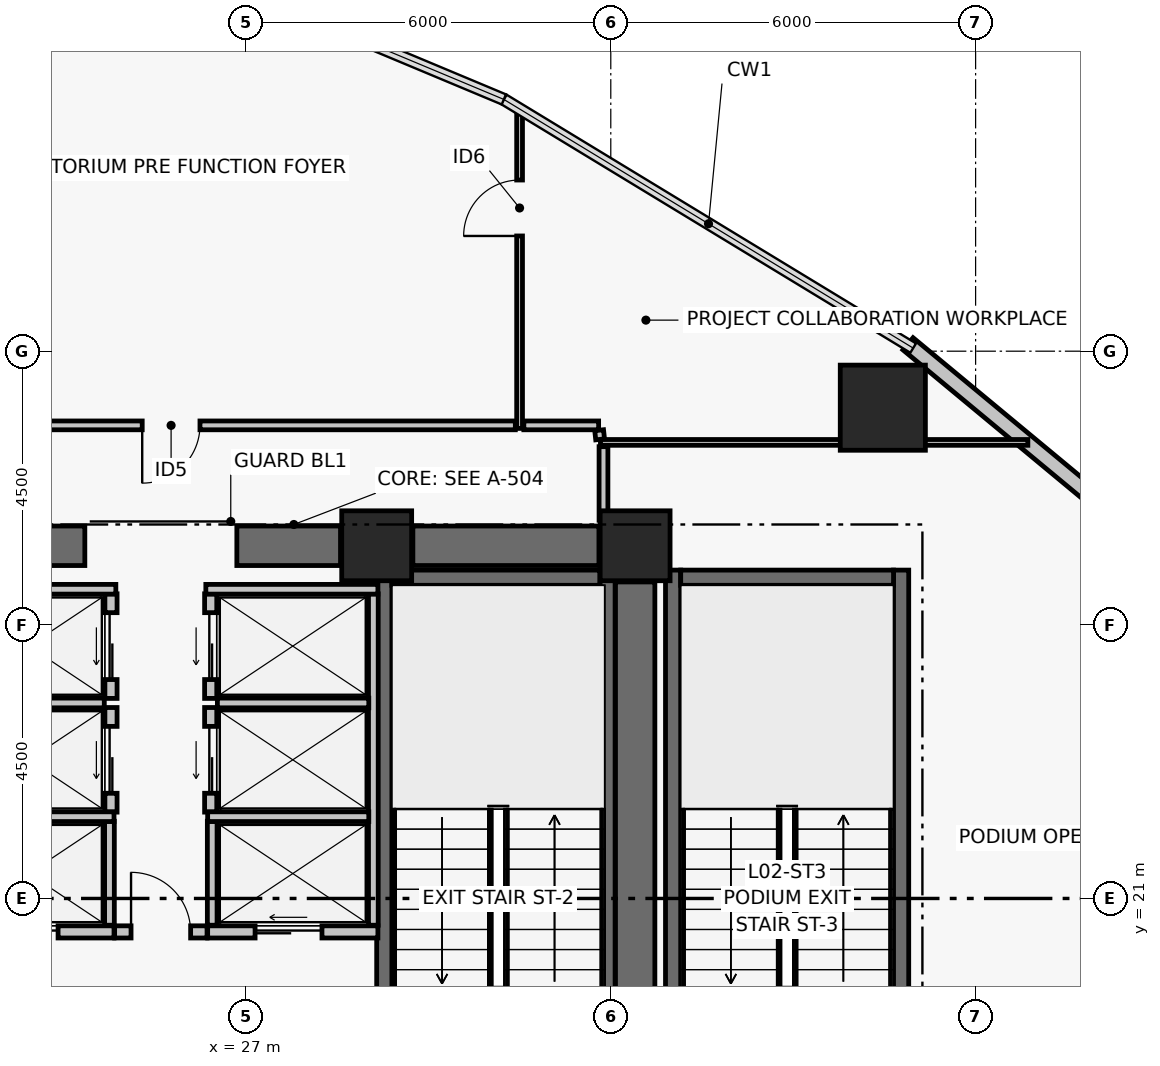
"""IFC4 building model, lengths in metres.
Left out: names, types, materials, properties, quantities, classifications, styles, units other than length and angle.
Written with IfcOpenShell. Run it as: python <this file> out.ifc"""

import sys

from ifc_helpers import new_model, si_unit, direction, frame, frame_2d, origin, origin_2d, place, context, subcontext, project, spatial, rectangle, hollow_rectangle, extrude, element, fill, save


model = new_model("IFC4")
c1 = context("Model", 3, precision=1e-05, world=origin(), true_north=direction((0.0, 1.0)))
c2 = subcontext(c1, "Body", "Model", "MODEL_VIEW")
j1 = project(units=[si_unit("LENGTHUNIT", "METRE"), si_unit("PLANEANGLEUNIT", "RADIAN")], contexts=[c1])
p1 = place(None, origin())
s1 = spatial("IfcSite", under=j1, at=p1, CompositionType="ELEMENT")
p2 = place(p1, origin())
s2 = spatial("IfcBuilding", under=s1, at=p2, CompositionType="ELEMENT")
p3 = place(p2, frame((0.0, 0.0, 12.0)))
s3 = spatial("IfcBuildingStorey", under=s2, at=p3, CompositionType="ELEMENT", Elevation=12.0)
for number, where, z_axis, x_axis in (
    (1, (29.15, 26.8, 0.0), (0.0, 0.0, 1.0), (1.0, 0.0, 0.0)),
    (2, (33.4, 26.8, 0.0), (0.0, 0.0, 1.0), (1.0, 0.0, 0.0)),
):
    element("IfcColumn", number, at=place(p3, frame(where, z_axis=z_axis, x_axis=x_axis)), inside=s3, PredefinedType="COLUMN", context=c2, shape_type="SweptSolid", body=[
        extrude(rectangle(XDim=1.15, YDim=1.15, at=origin_2d()), origin(), (0.0, 0.0, 1.0), 6.0),
    ])
p4 = place(p3, frame((22.645, 26.8, 0.0), z_axis=(0.0, 0.0, 1.0), x_axis=(1.0, 0.0, 0.0)))
e3 = element("IfcWall", 3, at=p4, inside=s3, PredefinedType="SHEAR", context=c2, shape_type="SweptSolid", body=[
    extrude(rectangle(XDim=1.705, YDim=0.65, at=frame_2d((0.853, 0.0))), origin(), (0.0, 0.0, 1.0), 5.68),
])
p5 = place(p3, frame((26.85, 26.8, 0.0), z_axis=(0.0, 0.0, 1.0), x_axis=(1.0, 0.0, 0.0)))
e4 = element("IfcWall", 4, at=p5, inside=s3, PredefinedType="SHEAR", context=c2, shape_type="SweptSolid", body=[
    extrude(rectangle(XDim=1.705, YDim=0.65, at=frame_2d((0.853, 0.0))), origin(), (0.0, 0.0, 1.0), 5.68),
])
p6 = place(p3, frame((29.745, 26.8, 0.0), z_axis=(0.0, 0.0, 1.0), x_axis=(1.0, 0.0, 0.0)))
e5 = element("IfcWall", 5, at=p6, inside=s3, PredefinedType="SHEAR", context=c2, shape_type="SweptSolid", body=[
    extrude(rectangle(XDim=3.06, YDim=0.65, at=frame_2d((1.53, 0.0))), origin(), (0.0, 0.0, 1.0), 5.68),
])
p7 = place(p3, frame((33.4, 17.795, 0.0), z_axis=(0.0, 0.0, 1.0), x_axis=(0.0, 1.0, 0.0)))
e6 = element("IfcWall", 6, at=p7, inside=s3, PredefinedType="SHEAR", context=c2, shape_type="SweptSolid", body=[
    extrude(rectangle(XDim=8.41, YDim=0.65, at=frame_2d((4.205, 0.0))), origin(), (0.0, 0.0, 1.0), 5.68),
])
p8 = place(p3, frame((29.275, 17.6, 0.0), z_axis=(0.0, 0.0, 1.0), x_axis=(0.0, 1.0, 0.0)))
e7 = element("IfcWall", 7, at=p8, inside=s3, PredefinedType="SHEAR", context=c2, shape_type="SweptSolid", body=[
    extrude(rectangle(XDim=8.8, YDim=0.25, at=frame_2d((4.4, 0.0))), origin(), (0.0, 0.0, 1.0), 5.68),
])
p9 = place(p8, frame((0.35, 0.0, 0.0)))
e8 = element("IfcOpeningElement", 8, at=p9, cuts=e7, PredefinedType="OPENING", context=c2, shape_type="SweptSolid", body=[
    extrude(rectangle(XDim=1.05, YDim=2.08, at=frame_2d((0.525, 1.04))), frame((0.0, 0.135, 0.0), z_axis=(0.0, -1.0, 0.0), x_axis=(1.0, 0.0, 0.0)), (0.0, 0.0, 1.0), 0.27),
])
p10 = place(p3, frame((32.946, 17.6, 0.0), z_axis=(0.0, 0.0, 1.0), x_axis=(0.0, 1.0, 0.0)))
e9 = element("IfcWall", 9, at=p10, inside=s3, PredefinedType="SHEAR", context=c2, shape_type="SweptSolid", body=[
    extrude(rectangle(XDim=8.8, YDim=0.25, at=frame_2d((4.4, 0.0))), origin(), (0.0, 0.0, 1.0), 5.68),
])
p11 = place(p3, frame((29.4, 26.275, 0.0), z_axis=(0.0, 0.0, 1.0), x_axis=(1.0, 0.0, 0.0)))
e10 = element("IfcWall", 10, at=p11, inside=s3, PredefinedType="SHEAR", context=c2, shape_type="SweptSolid", body=[
    extrude(rectangle(XDim=3.421, YDim=0.25, at=frame_2d((1.71, 0.0))), origin(), (0.0, 0.0, 1.0), 5.68),
])
for number, where, z_axis, x_axis in (
    (11, (34.025, 17.6, 0.0), (0.0, 0.0, 1.0), (0.0, 1.0, 0.0)),
    (12, (37.775, 17.6, 0.0), (0.0, 0.0, 1.0), (0.0, 1.0, 0.0)),
):
    element("IfcWall", number, at=place(p3, frame(where, z_axis=z_axis, x_axis=x_axis)), inside=s3, PredefinedType="SHEAR", context=c2, shape_type="SweptSolid", body=[
        extrude(rectangle(XDim=8.8, YDim=0.25, at=frame_2d((4.4, 0.0))), origin(), (0.0, 0.0, 1.0), 5.68),
    ])
p12 = place(p3, frame((34.15, 26.275, 0.0), z_axis=(0.0, 0.0, 1.0), x_axis=(1.0, 0.0, 0.0)))
e13 = element("IfcWall", 13, at=p12, inside=s3, PredefinedType="SHEAR", context=c2, shape_type="SweptSolid", body=[
    extrude(rectangle(XDim=3.5, YDim=0.25, at=frame_2d((1.75, 0.0))), origin(), (0.0, 0.0, 1.0), 5.68),
])
p13 = place(p3, frame((37.474, 29.071, 0.0), z_axis=(0.0, 0.0, 1.0), x_axis=(1.0, 0.0, 0.0)))
e14 = element("IfcColumn", 14, at=p13, inside=s3, PredefinedType="COLUMN", context=c2, shape_type="SweptSolid", body=[
    extrude(hollow_rectangle(XDim=1.4, YDim=1.4, WallThickness=0.055, at=origin_2d()), origin(), (0.0, 0.0, 1.0), 6.0),
])
p14 = place(p3, frame((37.888, 30.121, 0.0), z_axis=(0.0, 0.0, 1.0), x_axis=(0.769752944783, -0.638341917782, 0.0)))
e15 = element("IfcWall", 15, at=p14, inside=s3, PredefinedType="PARTITIONING", context=c2, shape_type="SweptSolid", body=[
    extrude(rectangle(XDim=8.167, YDim=0.26, at=frame_2d((4.083, 0.0))), origin(), (0.0, 0.0, 1.0), 5.68),
])
p15 = place(p3, frame((24.84, 20.45, 0.0), z_axis=(0.0, 0.0, 1.0), x_axis=(1.0, 0.0, 0.0)))
e16 = element("IfcWall", 16, at=p15, inside=s3, PredefinedType="PARTITIONING", context=c2, shape_type="SweptSolid", body=[
    extrude(rectangle(XDim=1.52, YDim=0.2, at=frame_2d((0.76, 0.0))), origin(), (0.0, 0.0, 1.0), 5.68),
])
p16 = place(p15, frame((0.27, 0.0, 0.0)))
e17 = element("IfcOpeningElement", 17, at=p16, cuts=e16, PredefinedType="OPENING", context=c2, shape_type="SweptSolid", body=[
    extrude(rectangle(XDim=0.98, YDim=2.06, at=frame_2d((0.49, 1.03))), frame((0.0, 0.11, 0.0), z_axis=(0.0, -1.0, 0.0), x_axis=(1.0, 0.0, 0.0)), (0.0, 0.0, 1.0), 0.22),
])
p17 = place(p3, frame((22.03, 20.45, 0.0), z_axis=(0.0, 0.0, 1.0), x_axis=(1.0, 0.0, 0.0)))
e18 = element("IfcWall", 18, at=p17, inside=s3, PredefinedType="PARTITIONING", context=c2, shape_type="SweptSolid", body=[
    extrude(rectangle(XDim=2.8, YDim=0.2, at=frame_2d((1.4, 0.0))), origin(), (0.0, 0.0, 1.0), 5.68),
])
p18 = place(p17, frame((0.78, 0.0, 0.0)))
e19 = element("IfcOpeningElement", 19, at=p18, cuts=e18, PredefinedType="OPENING", context=c2, shape_type="SweptSolid", body=[
    extrude(rectangle(XDim=1.1, YDim=2.08, at=frame_2d((0.55, 1.04))), frame((0.0, 0.11, 0.0), z_axis=(0.0, -1.0, 0.0), x_axis=(1.0, 0.0, 0.0)), (0.0, 0.0, 1.0), 0.22),
])
p19 = place(p3, frame((26.37, 20.45, 0.0), z_axis=(0.0, 0.0, 1.0), x_axis=(1.0, 0.0, 0.0)))
e20 = element("IfcWall", 20, at=p19, inside=s3, PredefinedType="PARTITIONING", context=c2, shape_type="SweptSolid", body=[
    extrude(rectangle(XDim=2.8, YDim=0.2, at=frame_2d((1.4, 0.0))), origin(), (0.0, 0.0, 1.0), 5.68),
])
p20 = place(p19, frame((0.78, 0.0, 0.0)))
e21 = element("IfcOpeningElement", 21, at=p20, cuts=e20, PredefinedType="OPENING", context=c2, shape_type="SweptSolid", body=[
    extrude(rectangle(XDim=1.1, YDim=2.08, at=frame_2d((0.55, 1.04))), frame((0.0, 0.11, 0.0), z_axis=(0.0, -1.0, 0.0), x_axis=(1.0, 0.0, 0.0)), (0.0, 0.0, 1.0), 0.22),
])
p21 = place(p3, frame((24.78, 22.42, 0.0), z_axis=(0.0, 0.0, 1.0), x_axis=(0.0, 1.0, 0.0)))
e22 = element("IfcWall", 22, at=p21, inside=s3, PredefinedType="PARTITIONING", context=c2, shape_type="SweptSolid", body=[
    extrude(rectangle(XDim=1.72, YDim=0.2, at=frame_2d((0.86, 0.0))), origin(), (0.0, 0.0, 1.0), 5.68),
])
p22 = place(p21, frame((0.31, 0.0, 0.0)))
e23 = element("IfcOpeningElement", 23, at=p22, cuts=e22, PredefinedType="OPENING", context=c2, shape_type="SweptSolid", body=[
    extrude(rectangle(XDim=1.1, YDim=2.08, at=frame_2d((0.55, 1.04))), frame((0.0, 0.11, 0.0), z_axis=(0.0, -1.0, 0.0), x_axis=(1.0, 0.0, 0.0)), (0.0, 0.0, 1.0), 0.22),
])
p23 = place(p3, frame((24.78, 24.29, 0.0), z_axis=(0.0, 0.0, 1.0), x_axis=(0.0, 1.0, 0.0)))
e24 = element("IfcWall", 24, at=p23, inside=s3, PredefinedType="PARTITIONING", context=c2, shape_type="SweptSolid", body=[
    extrude(rectangle(XDim=1.72, YDim=0.2, at=frame_2d((0.86, 0.0))), origin(), (0.0, 0.0, 1.0), 5.68),
])
p24 = place(p23, frame((0.31, 0.0, 0.0)))
e25 = element("IfcOpeningElement", 25, at=p24, cuts=e24, PredefinedType="OPENING", context=c2, shape_type="SweptSolid", body=[
    extrude(rectangle(XDim=1.1, YDim=2.08, at=frame_2d((0.55, 1.04))), frame((0.0, 0.11, 0.0), z_axis=(0.0, -1.0, 0.0), x_axis=(1.0, 0.0, 0.0)), (0.0, 0.0, 1.0), 0.22),
])
p25 = place(p3, frame((26.42, 22.42, 0.0), z_axis=(0.0, 0.0, 1.0), x_axis=(0.0, 1.0, 0.0)))
e26 = element("IfcWall", 26, at=p25, inside=s3, PredefinedType="PARTITIONING", context=c2, shape_type="SweptSolid", body=[
    extrude(rectangle(XDim=1.72, YDim=0.2, at=frame_2d((0.86, 0.0))), origin(), (0.0, 0.0, 1.0), 5.68),
])
p26 = place(p25, frame((0.31, 0.0, 0.0)))
e27 = element("IfcOpeningElement", 27, at=p26, cuts=e26, PredefinedType="OPENING", context=c2, shape_type="SweptSolid", body=[
    extrude(rectangle(XDim=1.1, YDim=2.08, at=frame_2d((0.55, 1.04))), frame((0.0, 0.11, 0.0), z_axis=(0.0, -1.0, 0.0), x_axis=(1.0, 0.0, 0.0)), (0.0, 0.0, 1.0), 0.22),
])
p27 = place(p3, frame((26.42, 24.29, 0.0), z_axis=(0.0, 0.0, 1.0), x_axis=(0.0, 1.0, 0.0)))
e28 = element("IfcWall", 28, at=p27, inside=s3, PredefinedType="PARTITIONING", context=c2, shape_type="SweptSolid", body=[
    extrude(rectangle(XDim=1.72, YDim=0.2, at=frame_2d((0.86, 0.0))), origin(), (0.0, 0.0, 1.0), 5.68),
])
p28 = place(p27, frame((0.31, 0.0, 0.0)))
e29 = element("IfcOpeningElement", 29, at=p28, cuts=e28, PredefinedType="OPENING", context=c2, shape_type="SweptSolid", body=[
    extrude(rectangle(XDim=1.1, YDim=2.08, at=frame_2d((0.55, 1.04))), frame((0.0, 0.11, 0.0), z_axis=(0.0, -1.0, 0.0), x_axis=(1.0, 0.0, 0.0)), (0.0, 0.0, 1.0), 0.22),
])
p29 = place(p3, frame((24.755, 20.56, 0.0), z_axis=(0.0, 0.0, 1.0), x_axis=(0.0, 1.0, 0.0)))
e30 = element("IfcWall", 30, at=p29, inside=s3, PredefinedType="PARTITIONING", context=c2, shape_type="SweptSolid", body=[
    extrude(rectangle(XDim=1.71, YDim=0.16, at=frame_2d((0.855, 0.0))), origin(), (0.0, 0.0, 1.0), 5.68),
])
p30 = place(p3, frame((22.18, 22.345, 0.0), z_axis=(0.0, 0.0, 1.0), x_axis=(1.0, 0.0, 0.0)))
e31 = element("IfcWall", 31, at=p30, inside=s3, PredefinedType="PARTITIONING", context=c2, shape_type="SweptSolid", body=[
    extrude(rectangle(XDim=2.65, YDim=0.16, at=frame_2d((1.325, 0.0))), origin(), (0.0, 0.0, 1.0), 5.68),
])
p31 = place(p3, frame((22.18, 24.215, 0.0), z_axis=(0.0, 0.0, 1.0), x_axis=(1.0, 0.0, 0.0)))
e32 = element("IfcWall", 32, at=p31, inside=s3, PredefinedType="PARTITIONING", context=c2, shape_type="SweptSolid", body=[
    extrude(rectangle(XDim=2.49, YDim=0.16, at=frame_2d((1.245, 0.0))), origin(), (0.0, 0.0, 1.0), 5.68),
])
p32 = place(p3, frame((22.03, 26.085, 0.0), z_axis=(0.0, 0.0, 1.0), x_axis=(1.0, 0.0, 0.0)))
e33 = element("IfcWall", 33, at=p32, inside=s3, PredefinedType="PARTITIONING", context=c2, shape_type="SweptSolid", body=[
    extrude(rectangle(XDim=2.83, YDim=0.16, at=frame_2d((1.415, 0.0))), origin(), (0.0, 0.0, 1.0), 5.68),
])
p33 = place(p3, frame((29.095, 20.56, 0.0), z_axis=(0.0, 0.0, 1.0), x_axis=(0.0, 1.0, 0.0)))
e34 = element("IfcWall", 34, at=p33, inside=s3, PredefinedType="PARTITIONING", context=c2, shape_type="SweptSolid", body=[
    extrude(rectangle(XDim=5.45, YDim=0.16, at=frame_2d((2.725, 0.0))), origin(), (0.0, 0.0, 1.0), 5.68),
])
p34 = place(p3, frame((26.445, 20.56, 0.0), z_axis=(0.0, 0.0, 1.0), x_axis=(0.0, 1.0, 0.0)))
e35 = element("IfcWall", 35, at=p34, inside=s3, PredefinedType="PARTITIONING", context=c2, shape_type="SweptSolid", body=[
    extrude(rectangle(XDim=1.71, YDim=0.16, at=frame_2d((0.855, 0.0))), origin(), (0.0, 0.0, 1.0), 5.68),
])
p35 = place(p3, frame((26.37, 22.345, 0.0), z_axis=(0.0, 0.0, 1.0), x_axis=(1.0, 0.0, 0.0)))
e36 = element("IfcWall", 36, at=p35, inside=s3, PredefinedType="PARTITIONING", context=c2, shape_type="SweptSolid", body=[
    extrude(rectangle(XDim=2.65, YDim=0.16, at=frame_2d((1.325, 0.0))), origin(), (0.0, 0.0, 1.0), 5.68),
])
p36 = place(p3, frame((26.53, 24.215, 0.0), z_axis=(0.0, 0.0, 1.0), x_axis=(1.0, 0.0, 0.0)))
e37 = element("IfcWall", 37, at=p36, inside=s3, PredefinedType="PARTITIONING", context=c2, shape_type="SweptSolid", body=[
    extrude(rectangle(XDim=2.49, YDim=0.16, at=frame_2d((1.245, 0.0))), origin(), (0.0, 0.0, 1.0), 5.68),
])
p37 = place(p3, frame((26.34, 26.085, 0.0), z_axis=(0.0, 0.0, 1.0), x_axis=(1.0, 0.0, 0.0)))
e38 = element("IfcWall", 38, at=p37, inside=s3, PredefinedType="PARTITIONING", context=c2, shape_type="SweptSolid", body=[
    extrude(rectangle(XDim=2.83, YDim=0.16, at=frame_2d((1.415, 0.0))), origin(), (0.0, 0.0, 1.0), 5.68),
])
p38 = place(p3, frame((33.74, 27.22, 0.0), z_axis=(0.0, 0.0, 1.0), x_axis=(-1.0, 0.0, 0.0)))
e39 = element("IfcWall", 39, at=p38, inside=s3, PredefinedType="PARTITIONING", context=c2, shape_type="SweptSolid", body=[
    extrude(rectangle(XDim=0.86, YDim=0.145, at=frame_2d((0.43, 0.0))), origin(), (0.0, 0.0, 1.0), 4.76),
])
p39 = place(p3, frame((32.88, 27.22, 0.0), z_axis=(0.0, 0.0, 1.0), x_axis=(0.0, 1.0, 0.0)))
e40 = element("IfcWall", 40, at=p39, inside=s3, PredefinedType="PARTITIONING", context=c2, shape_type="SweptSolid", body=[
    extrude(rectangle(XDim=1.21, YDim=0.145, at=frame_2d((0.605, 0.0))), origin(), (0.0, 0.0, 1.0), 4.81),
])
p40 = place(p3, frame((32.8, 28.78, 0.0), z_axis=(0.0, 0.0, 1.0), x_axis=(-1.0, 0.0, 0.0)))
e41 = element("IfcWall", 41, at=p40, inside=s3, PredefinedType="PARTITIONING", context=c2, shape_type="SweptSolid", body=[
    extrude(rectangle(XDim=1.23, YDim=0.145, at=frame_2d((0.615, 0.0))), origin(), (0.0, 0.0, 1.0), 5.21),
])
p41 = place(p3, frame((31.43, 28.78, 0.0), z_axis=(0.0, 0.0, 1.0), x_axis=(-1.0, 0.0, 0.0)))
e42 = element("IfcWall", 42, at=p41, inside=s3, PredefinedType="PARTITIONING", context=c2, shape_type="SweptSolid", body=[
    extrude(rectangle(XDim=9.36, YDim=0.145, at=frame_2d((4.68, 0.0))), origin(), (0.0, 0.0, 1.0), 4.76),
])
p42 = place(p41, frame((5.186, 0.0, 0.0)))
e43 = element("IfcOpeningElement", 43, at=p42, cuts=e42, PredefinedType="OPENING", context=c2, shape_type="SweptSolid", body=[
    extrude(rectangle(XDim=0.95, YDim=2.06, at=frame_2d((0.475, 1.03))), frame((0.0, 0.083, 0.0), z_axis=(0.0, -1.0, 0.0), x_axis=(1.0, 0.0, 0.0)), (0.0, 0.0, 1.0), 0.165),
])
p43 = place(p3, frame((31.5, 28.73, 0.0), z_axis=(0.0, 0.0, 1.0), x_axis=(0.0, 1.0, 0.0)))
e44 = element("IfcWall", 44, at=p43, inside=s3, PredefinedType="PARTITIONING", context=c2, shape_type="SweptSolid", body=[
    extrude(rectangle(XDim=5.265, YDim=0.095, at=frame_2d((2.633, 0.0))), origin(), (0.0, 0.0, 1.0), 5.06),
])
p44 = place(p43, frame((3.165, 0.0, 0.0)))
e45 = element("IfcOpeningElement", 45, at=p44, cuts=e44, PredefinedType="OPENING", context=c2, shape_type="SweptSolid", body=[
    extrude(rectangle(XDim=0.92, YDim=2.05, at=frame_2d((0.46, 1.025))), frame((0.0, 0.057, 0.0), z_axis=(0.0, -1.0, 0.0), x_axis=(1.0, 0.0, 0.0)), (0.0, 0.0, 1.0), 0.115),
])
p45 = place(p3, frame((32.83, 28.5, 0.0), z_axis=(0.0, 0.0, 1.0), x_axis=(1.0, 0.0, 0.0)))
e46 = element("IfcWall", 46, at=p45, inside=s3, PredefinedType="PARTITIONING", context=c2, shape_type="SweptSolid", body=[
    extrude(rectangle(XDim=7.029, YDim=0.095, at=frame_2d((3.515, 0.0))), origin(), (0.0, 0.0, 1.0), 4.76),
])
p46 = place(p3, frame((32.809, 28.7, 0.0), z_axis=(0.0, 0.0, 1.0), x_axis=(0.106362415448, -0.994327429261, 0.0)))
e47 = element("IfcWall", 47, at=p46, inside=s3, PredefinedType="PARTITIONING", context=c2, shape_type="SweptSolid", body=[
    extrude(rectangle(XDim=0.152, YDim=0.145, at=frame_2d((0.076, 0.0))), origin(), (0.0, 0.0, 1.0), 5.21),
])
p47 = place(p16, origin())
e48 = element("IfcDoor", 48, at=p47, inside=s3, OperationType="SINGLE_SWING_LEFT", PredefinedType="DOOR", context=c2, shape_type="SweptSolid", body=[
    extrude(rectangle(XDim=0.98, YDim=2.06, at=frame_2d((0.49, 1.03))), frame((0.0, 0.025, 0.0), z_axis=(0.0, -1.0, 0.0), x_axis=(1.0, 0.0, 0.0)), (0.0, 0.0, 1.0), 0.05),
])
fill(e17, e48)
p48 = place(p18, origin())
e49 = element("IfcDoor", 49, at=p48, inside=s3, OperationType="DOUBLE_DOOR_SLIDING", PredefinedType="DOOR", context=c2, shape_type="SweptSolid", body=[
    extrude(rectangle(XDim=1.1, YDim=2.08, at=frame_2d((0.55, 1.04))), frame((0.0, 0.025, 0.0), z_axis=(0.0, -1.0, 0.0), x_axis=(1.0, 0.0, 0.0)), (0.0, 0.0, 1.0), 0.05),
])
fill(e19, e49)
p49 = place(p20, origin())
e50 = element("IfcDoor", 50, at=p49, inside=s3, OperationType="DOUBLE_DOOR_SLIDING", PredefinedType="DOOR", context=c2, shape_type="SweptSolid", body=[
    extrude(rectangle(XDim=1.1, YDim=2.08, at=frame_2d((0.55, 1.04))), frame((0.0, 0.025, 0.0), z_axis=(0.0, -1.0, 0.0), x_axis=(1.0, 0.0, 0.0)), (0.0, 0.0, 1.0), 0.05),
])
fill(e21, e50)
p50 = place(p22, origin())
e51 = element("IfcDoor", 51, at=p50, inside=s3, OperationType="DOUBLE_DOOR_SLIDING", PredefinedType="DOOR", context=c2, shape_type="SweptSolid", body=[
    extrude(rectangle(XDim=1.1, YDim=2.08, at=frame_2d((0.55, 1.04))), frame((0.0, 0.025, 0.0), z_axis=(0.0, -1.0, 0.0), x_axis=(1.0, 0.0, 0.0)), (0.0, 0.0, 1.0), 0.05),
])
fill(e23, e51)
p51 = place(p24, origin())
e52 = element("IfcDoor", 52, at=p51, inside=s3, OperationType="DOUBLE_DOOR_SLIDING", PredefinedType="DOOR", context=c2, shape_type="SweptSolid", body=[
    extrude(rectangle(XDim=1.1, YDim=2.08, at=frame_2d((0.55, 1.04))), frame((0.0, 0.025, 0.0), z_axis=(0.0, -1.0, 0.0), x_axis=(1.0, 0.0, 0.0)), (0.0, 0.0, 1.0), 0.05),
])
fill(e25, e52)
p52 = place(p26, origin())
e53 = element("IfcDoor", 53, at=p52, inside=s3, OperationType="DOUBLE_DOOR_SLIDING", PredefinedType="DOOR", context=c2, shape_type="SweptSolid", body=[
    extrude(rectangle(XDim=1.1, YDim=2.08, at=frame_2d((0.55, 1.04))), frame((0.0, 0.025, 0.0), z_axis=(0.0, -1.0, 0.0), x_axis=(1.0, 0.0, 0.0)), (0.0, 0.0, 1.0), 0.05),
])
fill(e27, e53)
p53 = place(p28, origin())
e54 = element("IfcDoor", 54, at=p53, inside=s3, OperationType="DOUBLE_DOOR_SLIDING", PredefinedType="DOOR", context=c2, shape_type="SweptSolid", body=[
    extrude(rectangle(XDim=1.1, YDim=2.08, at=frame_2d((0.55, 1.04))), frame((0.0, 0.025, 0.0), z_axis=(0.0, -1.0, 0.0), x_axis=(1.0, 0.0, 0.0)), (0.0, 0.0, 1.0), 0.05),
])
fill(e29, e54)
p54 = place(p42, origin())
e55 = element("IfcDoor", 55, at=p54, inside=s3, OperationType="SINGLE_SWING_RIGHT", PredefinedType="DOOR", context=c2, shape_type="SweptSolid", body=[
    extrude(rectangle(XDim=0.95, YDim=2.06, at=frame_2d((0.475, 1.03))), frame((0.0, 0.025, 0.0), z_axis=(0.0, -1.0, 0.0), x_axis=(1.0, 0.0, 0.0)), (0.0, 0.0, 1.0), 0.05),
])
fill(e43, e55)
p55 = place(p44, origin())
e56 = element("IfcDoor", 56, at=p55, inside=s3, OperationType="SINGLE_SWING_LEFT", PredefinedType="DOOR", context=c2, shape_type="SweptSolid", body=[
    extrude(rectangle(XDim=0.92, YDim=2.05, at=frame_2d((0.46, 1.025))), frame((0.0, 0.025, 0.0), z_axis=(0.0, -1.0, 0.0), x_axis=(1.0, 0.0, 0.0)), (0.0, 0.0, 1.0), 0.05),
])
fill(e45, e56)
save(model, sys.argv[1])
